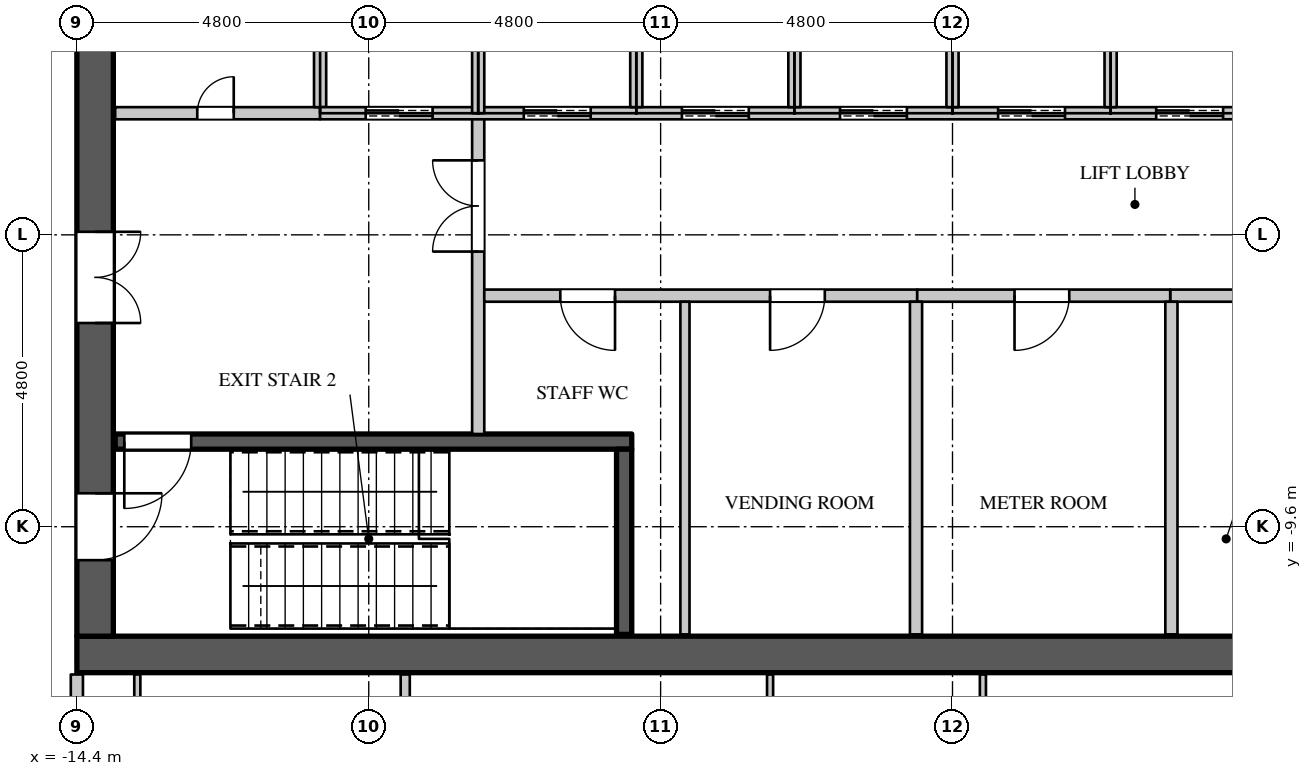
"""IFC4 building model, lengths in metres.
Left out: names, types, materials, properties, quantities, classifications, styles, units other than length and angle.
Written with IfcOpenShell. Run it as: python <this file> out.ifc"""

import sys

from ifc_helpers import new_model, si_unit, direction, frame, frame_2d, origin, place, context, subcontext, project, spatial, rectangle, extrude, element, fill, save


model = new_model("IFC4")
c1 = context("Model", 3, precision=1e-05, world=origin(), true_north=direction((0.0, 1.0)))
c2 = subcontext(c1, "Body", "Model", "MODEL_VIEW")
j1 = project(units=[si_unit("LENGTHUNIT", "METRE"), si_unit("PLANEANGLEUNIT", "RADIAN")], contexts=[c1])
p1 = place(None, origin())
s1 = spatial("IfcSite", under=j1, at=p1, CompositionType="ELEMENT")
p2 = place(p1, origin())
s2 = spatial("IfcBuilding", under=s1, at=p2, CompositionType="ELEMENT")
p3 = place(p2, frame((0.0, 0.0, 260.1)))
s3 = spatial("IfcBuildingStorey", under=s2, at=p3, CompositionType="ELEMENT", Elevation=260.1)
p4 = place(p3, frame((-14.4, -11.7, 0.0), z_axis=(0.0, 0.0, 1.0), x_axis=(1.0, 0.0, 0.0)))
e1 = element("IfcWall", 1, at=p4, inside=s3, PredefinedType="SHEAR", context=c2, shape_type="SweptSolid", body=[
    extrude(rectangle(XDim=28.8, YDim=0.6, at=frame_2d((14.4, 0.0))), origin(), (0.0, 0.0, 1.0), 4.2),
])
p5 = place(p3, frame((-14.1, -11.4, 0.0), z_axis=(0.0, 0.0, 1.0), x_axis=(0.0, 1.0, 0.0)))
e2 = element("IfcWall", 2, at=p5, inside=s3, PredefinedType="SHEAR", context=c2, shape_type="SweptSolid", body=[
    extrude(rectangle(XDim=22.8, YDim=0.6, at=frame_2d((11.4, 0.0))), origin(), (0.0, 0.0, 1.0), 4.2),
])
p6 = place(p5, frame((20.45, 0.0, 0.0)))
e3 = element("IfcOpeningElement", 3, at=p6, cuts=e2, PredefinedType="OPENING", context=c2, shape_type="SweptSolid", body=[
    extrude(rectangle(XDim=1.1, YDim=2.2, at=frame_2d((0.55, 1.1))), frame((0.0, 0.31, 0.0), z_axis=(0.0, -1.0, 0.0), x_axis=(1.0, 0.0, 0.0)), (0.0, 0.0, 1.0), 0.62),
])
p7 = place(p5, frame((1.25, 0.0, 0.0)))
e4 = element("IfcOpeningElement", 4, at=p7, cuts=e2, PredefinedType="OPENING", context=c2, shape_type="SweptSolid", body=[
    extrude(rectangle(XDim=1.1, YDim=2.2, at=frame_2d((0.55, 1.1))), frame((0.0, 0.31, 0.0), z_axis=(0.0, -1.0, 0.0), x_axis=(1.0, 0.0, 0.0)), (0.0, 0.0, 1.0), 0.62),
])
p8 = place(p5, frame((16.15, 0.0, 0.0)))
e5 = element("IfcOpeningElement", 5, at=p8, cuts=e2, PredefinedType="OPENING", context=c2, shape_type="SweptSolid", body=[
    extrude(rectangle(XDim=1.5, YDim=2.4, at=frame_2d((0.75, 1.2))), frame((0.0, 0.31, 0.0), z_axis=(0.0, -1.0, 0.0), x_axis=(1.0, 0.0, 0.0)), (0.0, 0.0, 1.0), 0.62),
])
p9 = place(p5, frame((5.15, 0.0, 0.0)))
e6 = element("IfcOpeningElement", 6, at=p9, cuts=e2, PredefinedType="OPENING", context=c2, shape_type="SweptSolid", body=[
    extrude(rectangle(XDim=1.5, YDim=2.4, at=frame_2d((0.75, 1.2))), frame((0.0, 0.31, 0.0), z_axis=(0.0, -1.0, 0.0), x_axis=(1.0, 0.0, 0.0)), (0.0, 0.0, 1.0), 0.62),
])
p10 = place(p3, frame((-14.4, -14.3, 0.0), z_axis=(0.0, 0.0, 1.0), x_axis=(0.0, 1.0, 0.0)))
e7 = element("IfcWall", 7, at=p10, inside=s3, PredefinedType="PARTITIONING", context=c2, shape_type="SweptSolid", body=[
    extrude(rectangle(XDim=2.27, YDim=0.2, at=frame_2d((1.135, 0.0))), origin(), (0.0, 0.0, 1.0), 3.95),
])
p11 = place(p3, frame((-7.8, -8.075, 0.0), z_axis=(0.0, 0.0, 1.0), x_axis=(0.0, 1.0, 0.0)))
e8 = element("IfcWall", 8, at=p11, inside=s3, PredefinedType="PARTITIONING", context=c2, shape_type="SweptSolid", body=[
    extrude(rectangle(XDim=5.275, YDim=0.2, at=frame_2d((2.637, 0.0))), origin(), (0.0, 0.0, 1.0), 3.95),
])
p12 = place(p11, frame((3.0, 0.0, 0.0)))
e9 = element("IfcOpeningElement", 9, at=p12, cuts=e8, PredefinedType="OPENING", context=c2, shape_type="SweptSolid", body=[
    extrude(rectangle(XDim=1.5, YDim=2.4, at=frame_2d((0.75, 1.2))), frame((0.0, 0.11, 0.0), z_axis=(0.0, -1.0, 0.0), x_axis=(1.0, 0.0, 0.0)), (0.0, 0.0, 1.0), 0.22),
])
p13 = place(p3, frame((-7.7, -5.8, 0.0), z_axis=(0.0, 0.0, 1.0), x_axis=(1.0, 0.0, 0.0)))
e10 = element("IfcWall", 10, at=p13, inside=s3, PredefinedType="PARTITIONING", context=c2, shape_type="SweptSolid", body=[
    extrude(rectangle(XDim=7.12, YDim=0.2, at=frame_2d((3.56, 0.0))), origin(), (0.0, 0.0, 1.0), 3.95),
])
p14 = place(p13, frame((1.25, 0.0, 0.0)))
e11 = element("IfcOpeningElement", 11, at=p14, cuts=e10, PredefinedType="OPENING", context=c2, shape_type="SweptSolid", body=[
    extrude(rectangle(XDim=0.9, YDim=2.2, at=frame_2d((0.45, 1.1))), frame((0.0, 0.11, 0.0), z_axis=(0.0, -1.0, 0.0), x_axis=(1.0, 0.0, 0.0)), (0.0, 0.0, 1.0), 0.22),
])
p15 = place(p13, frame((4.7, 0.0, 0.0)))
e12 = element("IfcOpeningElement", 12, at=p15, cuts=e10, PredefinedType="OPENING", context=c2, shape_type="SweptSolid", body=[
    extrude(rectangle(XDim=0.9, YDim=2.2, at=frame_2d((0.45, 1.1))), frame((0.0, 0.11, 0.0), z_axis=(0.0, -1.0, 0.0), x_axis=(1.0, 0.0, 0.0)), (0.0, 0.0, 1.0), 0.22),
])
p16 = place(p3, frame((3.58, -5.8, 0.0), z_axis=(0.0, 0.0, 1.0), x_axis=(1.0, 0.0, 0.0)))
e13 = element("IfcWall", 13, at=p16, inside=s3, PredefinedType="PARTITIONING", context=c2, shape_type="SweptSolid", body=[
    extrude(rectangle(XDim=10.19, YDim=0.2, at=frame_2d((5.095, 0.0))), origin(), (0.0, 0.0, 1.0), 3.95),
])
p17 = place(p16, frame((2.0, 0.0, 0.0)))
e14 = element("IfcOpeningElement", 14, at=p17, cuts=e13, PredefinedType="OPENING", context=c2, shape_type="SweptSolid", body=[
    extrude(rectangle(XDim=0.9, YDim=2.2, at=frame_2d((0.45, 1.1))), frame((0.0, 0.11, 0.0), z_axis=(0.0, -1.0, 0.0), x_axis=(1.0, 0.0, 0.0)), (0.0, 0.0, 1.0), 0.22),
])
p18 = place(p16, frame((7.0, 0.0, 0.0)))
e15 = element("IfcOpeningElement", 15, at=p18, cuts=e13, PredefinedType="OPENING", context=c2, shape_type="SweptSolid", body=[
    extrude(rectangle(XDim=0.9, YDim=2.2, at=frame_2d((0.45, 1.1))), frame((0.0, 0.11, 0.0), z_axis=(0.0, -1.0, 0.0), x_axis=(1.0, 0.0, 0.0)), (0.0, 0.0, 1.0), 0.22),
])
p19 = place(p3, frame((-9.0, -17.925, 0.0), z_axis=(0.0, 0.0, 1.0), x_axis=(0.0, 1.0, 0.0)))
e16 = element("IfcWall", 16, at=p19, inside=s3, PredefinedType="PARTITIONING", context=c2, shape_type="SweptSolid", body=[
    extrude(rectangle(XDim=5.895, YDim=0.15, at=frame_2d((2.948, 0.0))), origin(), (0.0, 0.0, 1.0), 3.95),
])
p20 = place(p3, frame((-4.4, -11.37, 0.0), z_axis=(0.0, 0.0, 1.0), x_axis=(0.0, 1.0, 0.0)))
e17 = element("IfcWall", 17, at=p20, inside=s3, PredefinedType="PARTITIONING", context=c2, shape_type="SweptSolid", body=[
    extrude(rectangle(XDim=5.47, YDim=0.15, at=frame_2d((2.735, 0.0))), origin(), (0.0, 0.0, 1.0), 3.95),
])
p21 = place(p3, frame((-13.77, -2.8, 0.0), z_axis=(0.0, 0.0, 1.0), x_axis=(1.0, 0.0, 0.0)))
e18 = element("IfcWall", 18, at=p21, inside=s3, PredefinedType="PARTITIONING", context=c2, shape_type="SweptSolid", body=[
    extrude(rectangle(XDim=3.37, YDim=0.2, at=frame_2d((1.685, 0.0))), origin(), (0.0, 0.0, 1.0), 3.95),
])
p22 = place(p21, frame((1.35, 0.0, 0.0)))
e19 = element("IfcOpeningElement", 19, at=p22, cuts=e18, PredefinedType="OPENING", context=c2, shape_type="SweptSolid", body=[
    extrude(rectangle(XDim=0.6, YDim=2.0, at=frame_2d((0.3, 1.0))), frame((0.0, 0.11, 0.0), z_axis=(0.0, -1.0, 0.0), x_axis=(1.0, 0.0, 0.0)), (0.0, 0.0, 1.0), 0.22),
])
p23 = place(p3, frame((-0.58, -5.8, 0.0), z_axis=(0.0, 0.0, 1.0), x_axis=(1.0, 0.0, 0.0)))
e20 = element("IfcWall", 20, at=p23, inside=s3, PredefinedType="PARTITIONING", context=c2, shape_type="SweptSolid", body=[
    extrude(rectangle(XDim=4.16, YDim=0.2, at=frame_2d((2.08, 0.0))), origin(), (0.0, 0.0, 1.0), 3.95),
])
p24 = place(p23, frame((1.6, 0.0, 0.0)))
e21 = element("IfcOpeningElement", 21, at=p24, cuts=e20, PredefinedType="OPENING", context=c2, shape_type="SweptSolid", body=[
    extrude(rectangle(XDim=0.9, YDim=2.2, at=frame_2d((0.45, 1.1))), frame((0.0, 0.11, 0.0), z_axis=(0.0, -1.0, 0.0), x_axis=(1.0, 0.0, 0.0)), (0.0, 0.0, 1.0), 0.22),
])
for number, where, z_axis, x_axis in (
    (22, (-0.6, -11.37, 0.0), (0.0, 0.0, 1.0), (0.0, 1.0, 0.0)),
    (23, (3.6, -11.37, 0.0), (0.0, 0.0, 1.0), (0.0, 1.0, 0.0)),
):
    element("IfcWall", number, at=place(p3, frame(where, z_axis=z_axis, x_axis=x_axis)), inside=s3, PredefinedType="PARTITIONING", context=c2, shape_type="SweptSolid", body=[
        extrude(rectangle(XDim=5.47, YDim=0.2, at=frame_2d((2.735, 0.0))), origin(), (0.0, 0.0, 1.0), 3.95),
    ])
p25 = place(p3, frame((-10.4, -2.7, 0.0), z_axis=(0.0, 0.0, 1.0), x_axis=(0.0, 1.0, 0.0)))
e24 = element("IfcWall", 24, at=p25, inside=s3, PredefinedType="PARTITIONING", context=c2, shape_type="SweptSolid", body=[
    extrude(rectangle(XDim=2.7, YDim=0.2, at=frame_2d((1.35, 0.0))), origin(), (0.0, 0.0, 1.0), 3.95),
])
p26 = place(p3, frame((-10.4, -2.8, 0.0), z_axis=(0.0, 0.0, 1.0), x_axis=(1.0, 0.0, 0.0)))
e25 = element("IfcWall", 25, at=p26, inside=s3, PredefinedType="PARTITIONING", context=c2, shape_type="SweptSolid", body=[
    extrude(rectangle(XDim=18.2, YDim=0.2, at=frame_2d((9.1, 0.0))), origin(), (0.0, 0.0, 1.0), 3.95),
])
p27 = place(p26, frame((0.75, 0.0, 0.0)))
e26 = element("IfcOpeningElement", 26, at=p27, cuts=e25, PredefinedType="OPENING", context=c2, shape_type="SweptSolid", body=[
    extrude(rectangle(XDim=1.1, YDim=2.2, at=frame_2d((0.55, 1.1))), frame((0.0, 0.11, 0.0), z_axis=(0.0, -1.0, 0.0), x_axis=(1.0, 0.0, 0.0)), (0.0, 0.0, 1.0), 0.22),
])
p28 = place(p26, frame((3.35, 0.0, 0.0)))
e27 = element("IfcOpeningElement", 27, at=p28, cuts=e25, PredefinedType="OPENING", context=c2, shape_type="SweptSolid", body=[
    extrude(rectangle(XDim=1.1, YDim=2.2, at=frame_2d((0.55, 1.1))), frame((0.0, 0.11, 0.0), z_axis=(0.0, -1.0, 0.0), x_axis=(1.0, 0.0, 0.0)), (0.0, 0.0, 1.0), 0.22),
])
p29 = place(p26, frame((5.95, 0.0, 0.0)))
e28 = element("IfcOpeningElement", 28, at=p29, cuts=e25, PredefinedType="OPENING", context=c2, shape_type="SweptSolid", body=[
    extrude(rectangle(XDim=1.1, YDim=2.2, at=frame_2d((0.55, 1.1))), frame((0.0, 0.11, 0.0), z_axis=(0.0, -1.0, 0.0), x_axis=(1.0, 0.0, 0.0)), (0.0, 0.0, 1.0), 0.22),
])
p30 = place(p26, frame((8.55, 0.0, 0.0)))
e29 = element("IfcOpeningElement", 29, at=p30, cuts=e25, PredefinedType="OPENING", context=c2, shape_type="SweptSolid", body=[
    extrude(rectangle(XDim=1.1, YDim=2.2, at=frame_2d((0.55, 1.1))), frame((0.0, 0.11, 0.0), z_axis=(0.0, -1.0, 0.0), x_axis=(1.0, 0.0, 0.0)), (0.0, 0.0, 1.0), 0.22),
])
p31 = place(p26, frame((11.15, 0.0, 0.0)))
e30 = element("IfcOpeningElement", 30, at=p31, cuts=e25, PredefinedType="OPENING", context=c2, shape_type="SweptSolid", body=[
    extrude(rectangle(XDim=1.1, YDim=2.2, at=frame_2d((0.55, 1.1))), frame((0.0, 0.11, 0.0), z_axis=(0.0, -1.0, 0.0), x_axis=(1.0, 0.0, 0.0)), (0.0, 0.0, 1.0), 0.22),
])
p32 = place(p26, frame((13.75, 0.0, 0.0)))
e31 = element("IfcOpeningElement", 31, at=p32, cuts=e25, PredefinedType="OPENING", context=c2, shape_type="SweptSolid", body=[
    extrude(rectangle(XDim=1.1, YDim=2.2, at=frame_2d((0.55, 1.1))), frame((0.0, 0.11, 0.0), z_axis=(0.0, -1.0, 0.0), x_axis=(1.0, 0.0, 0.0)), (0.0, 0.0, 1.0), 0.22),
])
p33 = place(p26, frame((16.35, 0.0, 0.0)))
e32 = element("IfcOpeningElement", 32, at=p33, cuts=e25, PredefinedType="OPENING", context=c2, shape_type="SweptSolid", body=[
    extrude(rectangle(XDim=1.1, YDim=2.2, at=frame_2d((0.55, 1.1))), frame((0.0, 0.11, 0.0), z_axis=(0.0, -1.0, 0.0), x_axis=(1.0, 0.0, 0.0)), (0.0, 0.0, 1.0), 0.22),
])
p34 = place(p3, frame((-7.8, -2.8, 0.0), z_axis=(0.0, 0.0, 1.0), x_axis=(0.0, 1.0, 0.0)))
e33 = element("IfcWall", 33, at=p34, inside=s3, PredefinedType="PARTITIONING", context=c2, shape_type="SweptSolid", body=[
    extrude(rectangle(XDim=2.8, YDim=0.2, at=frame_2d((1.4, 0.0))), origin(), (0.0, 0.0, 1.0), 3.95),
])
for number, where, z_axis, x_axis in (
    (34, (-5.2, -2.7, 0.0), (0.0, 0.0, 1.0), (0.0, 1.0, 0.0)),
    (35, (-2.6, -2.7, 0.0), (0.0, 0.0, 1.0), (0.0, 1.0, 0.0)),
    (36, (0.0, -2.7, 0.0), (0.0, 0.0, 1.0), (0.0, 1.0, 0.0)),
    (37, (2.6, -2.7, 0.0), (0.0, 0.0, 1.0), (0.0, 1.0, 0.0)),
):
    element("IfcWall", number, at=place(p3, frame(where, z_axis=z_axis, x_axis=x_axis)), inside=s3, PredefinedType="PARTITIONING", context=c2, shape_type="SweptSolid", body=[
        extrude(rectangle(XDim=2.6, YDim=0.2, at=frame_2d((1.3, 0.0))), origin(), (0.0, 0.0, 1.0), 3.95),
    ])
p35 = place(p3, frame((-13.77, -8.2, 0.0), z_axis=(0.0, 0.0, 1.0), x_axis=(1.0, 0.0, 0.0)))
e38 = element("IfcWall", 38, at=p35, inside=s3, PredefinedType="SHEAR", context=c2, shape_type="SweptSolid", body=[
    extrude(rectangle(XDim=8.495, YDim=0.25, at=frame_2d((4.248, 0.0))), origin(), (0.0, 0.0, 1.0), 3.95),
])
p36 = place(p35, frame((0.15, 0.0, 0.0)))
e39 = element("IfcOpeningElement", 39, at=p36, cuts=e38, PredefinedType="OPENING", context=c2, shape_type="SweptSolid", body=[
    extrude(rectangle(XDim=1.1, YDim=2.2, at=frame_2d((0.55, 1.1))), frame((0.0, 0.135, 0.0), z_axis=(0.0, -1.0, 0.0), x_axis=(1.0, 0.0, 0.0)), (0.0, 0.0, 1.0), 0.27),
])
p37 = place(p3, frame((-5.4, -11.37, 0.0), z_axis=(0.0, 0.0, 1.0), x_axis=(0.0, 1.0, 0.0)))
e40 = element("IfcWall", 40, at=p37, inside=s3, PredefinedType="SHEAR", context=c2, shape_type="SweptSolid", body=[
    extrude(rectangle(XDim=3.045, YDim=0.25, at=frame_2d((1.522, 0.0))), origin(), (0.0, 0.0, 1.0), 3.95),
])
p38 = place(p3, frame((-13.406, -16.0, 0.0), z_axis=(0.0, 0.0, 1.0), x_axis=(0.0, 1.0, 0.0)))
e41 = element("IfcWall", 41, at=p38, inside=s3, PredefinedType="PARTITIONING", context=c2, shape_type="SweptSolid", body=[
    extrude(rectangle(XDim=3.97, YDim=0.1, at=frame_2d((1.985, 0.0))), origin(), (0.0, 0.0, 1.0), 3.3),
])
p39 = place(p3, frame((-3.0, -17.95, 0.0), z_axis=(0.0, 0.0, 1.0), x_axis=(0.0, 1.0, 0.0)))
e42 = element("IfcWall", 42, at=p39, inside=s3, PredefinedType="PARTITIONING", context=c2, shape_type="SweptSolid", body=[
    extrude(rectangle(XDim=5.92, YDim=0.1, at=frame_2d((2.96, 0.0))), origin(), (0.0, 0.0, 1.0), 3.95),
])
p40 = place(p39, frame((2.5, 0.0, 0.0)))
e43 = element("IfcOpeningElement", 43, at=p40, cuts=e42, PredefinedType="OPENING", context=c2, shape_type="SweptSolid", body=[
    extrude(rectangle(XDim=0.9, YDim=2.2, at=frame_2d((0.45, 1.1))), frame((0.0, 0.06, 0.0), z_axis=(0.0, -1.0, 0.0), x_axis=(1.0, 0.0, 0.0)), (0.0, 0.0, 1.0), 0.12),
])
p41 = place(p3, frame((0.5, -17.925, 0.0), z_axis=(0.0, 0.0, 1.0), x_axis=(0.0, 1.0, 0.0)))
e44 = element("IfcWall", 44, at=p41, inside=s3, PredefinedType="PARTITIONING", context=c2, shape_type="SweptSolid", body=[
    extrude(rectangle(XDim=5.895, YDim=0.1, at=frame_2d((2.948, 0.0))), origin(), (0.0, 0.0, 1.0), 3.95),
])
p42 = place(p41, frame((2.5, 0.0, 0.0)))
e45 = element("IfcOpeningElement", 45, at=p42, cuts=e44, PredefinedType="OPENING", context=c2, shape_type="SweptSolid", body=[
    extrude(rectangle(XDim=0.9, YDim=2.2, at=frame_2d((0.45, 1.1))), frame((0.0, 0.06, 0.0), z_axis=(0.0, -1.0, 0.0), x_axis=(1.0, 0.0, 0.0)), (0.0, 0.0, 1.0), 0.12),
])
p43 = place(p22, origin())
e46 = element("IfcDoor", 46, at=p43, inside=s3, OperationType="SINGLE_SWING_RIGHT", PredefinedType="DOOR", context=c2, shape_type="SweptSolid", body=[
    extrude(rectangle(XDim=0.6, YDim=2.0, at=frame_2d((0.3, 1.0))), frame((0.0, 0.025, 0.0), z_axis=(0.0, -1.0, 0.0), x_axis=(1.0, 0.0, 0.0)), (0.0, 0.0, 1.0), 0.05),
])
fill(e19, e46)
p44 = place(p14, origin())
e47 = element("IfcDoor", 47, at=p44, inside=s3, OperationType="SINGLE_SWING_LEFT", PredefinedType="DOOR", context=c2, shape_type="SweptSolid", body=[
    extrude(rectangle(XDim=0.9, YDim=2.2, at=frame_2d((0.45, 1.1))), frame((0.0, 0.025, 0.0), z_axis=(0.0, -1.0, 0.0), x_axis=(1.0, 0.0, 0.0)), (0.0, 0.0, 1.0), 0.05),
])
fill(e11, e47)
p45 = place(p15, origin())
e48 = element("IfcDoor", 48, at=p45, inside=s3, OperationType="SINGLE_SWING_RIGHT", PredefinedType="DOOR", context=c2, shape_type="SweptSolid", body=[
    extrude(rectangle(XDim=0.9, YDim=2.2, at=frame_2d((0.45, 1.1))), frame((0.0, 0.025, 0.0), z_axis=(0.0, -1.0, 0.0), x_axis=(1.0, 0.0, 0.0)), (0.0, 0.0, 1.0), 0.05),
])
fill(e12, e48)
p46 = place(p24, origin())
e49 = element("IfcDoor", 49, at=p46, inside=s3, OperationType="SINGLE_SWING_RIGHT", PredefinedType="DOOR", context=c2, shape_type="SweptSolid", body=[
    extrude(rectangle(XDim=0.9, YDim=2.2, at=frame_2d((0.45, 1.1))), frame((0.0, 0.025, 0.0), z_axis=(0.0, -1.0, 0.0), x_axis=(1.0, 0.0, 0.0)), (0.0, 0.0, 1.0), 0.05),
])
fill(e21, e49)
p47 = place(p27, origin())
e50 = element("IfcDoor", 50, at=p47, inside=s3, OperationType="DOUBLE_DOOR_SLIDING", PredefinedType="DOOR", context=c2, shape_type="SweptSolid", body=[
    extrude(rectangle(XDim=1.1, YDim=2.2, at=frame_2d((0.55, 1.1))), frame((0.0, 0.025, 0.0), z_axis=(0.0, -1.0, 0.0), x_axis=(1.0, 0.0, 0.0)), (0.0, 0.0, 1.0), 0.05),
])
fill(e26, e50)
p48 = place(p28, origin())
e51 = element("IfcDoor", 51, at=p48, inside=s3, OperationType="DOUBLE_DOOR_SLIDING", PredefinedType="DOOR", context=c2, shape_type="SweptSolid", body=[
    extrude(rectangle(XDim=1.1, YDim=2.2, at=frame_2d((0.55, 1.1))), frame((0.0, 0.025, 0.0), z_axis=(0.0, -1.0, 0.0), x_axis=(1.0, 0.0, 0.0)), (0.0, 0.0, 1.0), 0.05),
])
fill(e27, e51)
p49 = place(p29, origin())
e52 = element("IfcDoor", 52, at=p49, inside=s3, OperationType="DOUBLE_DOOR_SLIDING", PredefinedType="DOOR", context=c2, shape_type="SweptSolid", body=[
    extrude(rectangle(XDim=1.1, YDim=2.2, at=frame_2d((0.55, 1.1))), frame((0.0, 0.025, 0.0), z_axis=(0.0, -1.0, 0.0), x_axis=(1.0, 0.0, 0.0)), (0.0, 0.0, 1.0), 0.05),
])
fill(e28, e52)
p50 = place(p30, origin())
e53 = element("IfcDoor", 53, at=p50, inside=s3, OperationType="DOUBLE_DOOR_SLIDING", PredefinedType="DOOR", context=c2, shape_type="SweptSolid", body=[
    extrude(rectangle(XDim=1.1, YDim=2.2, at=frame_2d((0.55, 1.1))), frame((0.0, 0.025, 0.0), z_axis=(0.0, -1.0, 0.0), x_axis=(1.0, 0.0, 0.0)), (0.0, 0.0, 1.0), 0.05),
])
fill(e29, e53)
p51 = place(p31, origin())
e54 = element("IfcDoor", 54, at=p51, inside=s3, OperationType="DOUBLE_DOOR_SLIDING", PredefinedType="DOOR", context=c2, shape_type="SweptSolid", body=[
    extrude(rectangle(XDim=1.1, YDim=2.2, at=frame_2d((0.55, 1.1))), frame((0.0, 0.025, 0.0), z_axis=(0.0, -1.0, 0.0), x_axis=(1.0, 0.0, 0.0)), (0.0, 0.0, 1.0), 0.05),
])
fill(e30, e54)
p52 = place(p32, origin())
e55 = element("IfcDoor", 55, at=p52, inside=s3, OperationType="DOUBLE_DOOR_SLIDING", PredefinedType="DOOR", context=c2, shape_type="SweptSolid", body=[
    extrude(rectangle(XDim=1.1, YDim=2.2, at=frame_2d((0.55, 1.1))), frame((0.0, 0.025, 0.0), z_axis=(0.0, -1.0, 0.0), x_axis=(1.0, 0.0, 0.0)), (0.0, 0.0, 1.0), 0.05),
])
fill(e31, e55)
p53 = place(p36, origin())
e56 = element("IfcDoor", 56, at=p53, inside=s3, OperationType="SINGLE_SWING_RIGHT", PredefinedType="DOOR", context=c2, shape_type="SweptSolid", body=[
    extrude(rectangle(XDim=1.1, YDim=2.2, at=frame_2d((0.55, 1.1))), frame((0.0, 0.025, 0.0), z_axis=(0.0, -1.0, 0.0), x_axis=(1.0, 0.0, 0.0)), (0.0, 0.0, 1.0), 0.05),
])
fill(e39, e56)
p54 = place(p12, origin())
e57 = element("IfcDoor", 57, at=p54, inside=s3, OperationType="DOUBLE_DOOR_SINGLE_SWING", PredefinedType="DOOR", context=c2, shape_type="SweptSolid", body=[
    extrude(rectangle(XDim=1.5, YDim=2.4, at=frame_2d((0.75, 1.2))), frame((0.0, 0.025, 0.0), z_axis=(0.0, -1.0, 0.0), x_axis=(1.0, 0.0, 0.0)), (0.0, 0.0, 1.0), 0.05),
])
fill(e9, e57)
p55 = place(p7, origin())
e58 = element("IfcDoor", 58, at=p55, inside=s3, OperationType="SINGLE_SWING_LEFT", PredefinedType="DOOR", context=c2, shape_type="SweptSolid", body=[
    extrude(rectangle(XDim=1.1, YDim=2.2, at=frame_2d((0.55, 1.1))), frame((0.0, -0.245, 0.0), z_axis=(0.0, -1.0, 0.0), x_axis=(1.0, 0.0, 0.0)), (0.0, 0.0, 1.0), 0.05),
])
fill(e4, e58)
p56 = place(p9, origin())
e59 = element("IfcDoor", 59, at=p56, inside=s3, OperationType="DOUBLE_DOOR_SINGLE_SWING", PredefinedType="DOOR", context=c2, shape_type="SweptSolid", body=[
    extrude(rectangle(XDim=1.5, YDim=2.4, at=frame_2d((0.75, 1.2))), frame((0.0, -0.245, 0.0), z_axis=(0.0, -1.0, 0.0), x_axis=(1.0, 0.0, 0.0)), (0.0, 0.0, 1.0), 0.05),
])
fill(e6, e59)
save(model, sys.argv[1])
